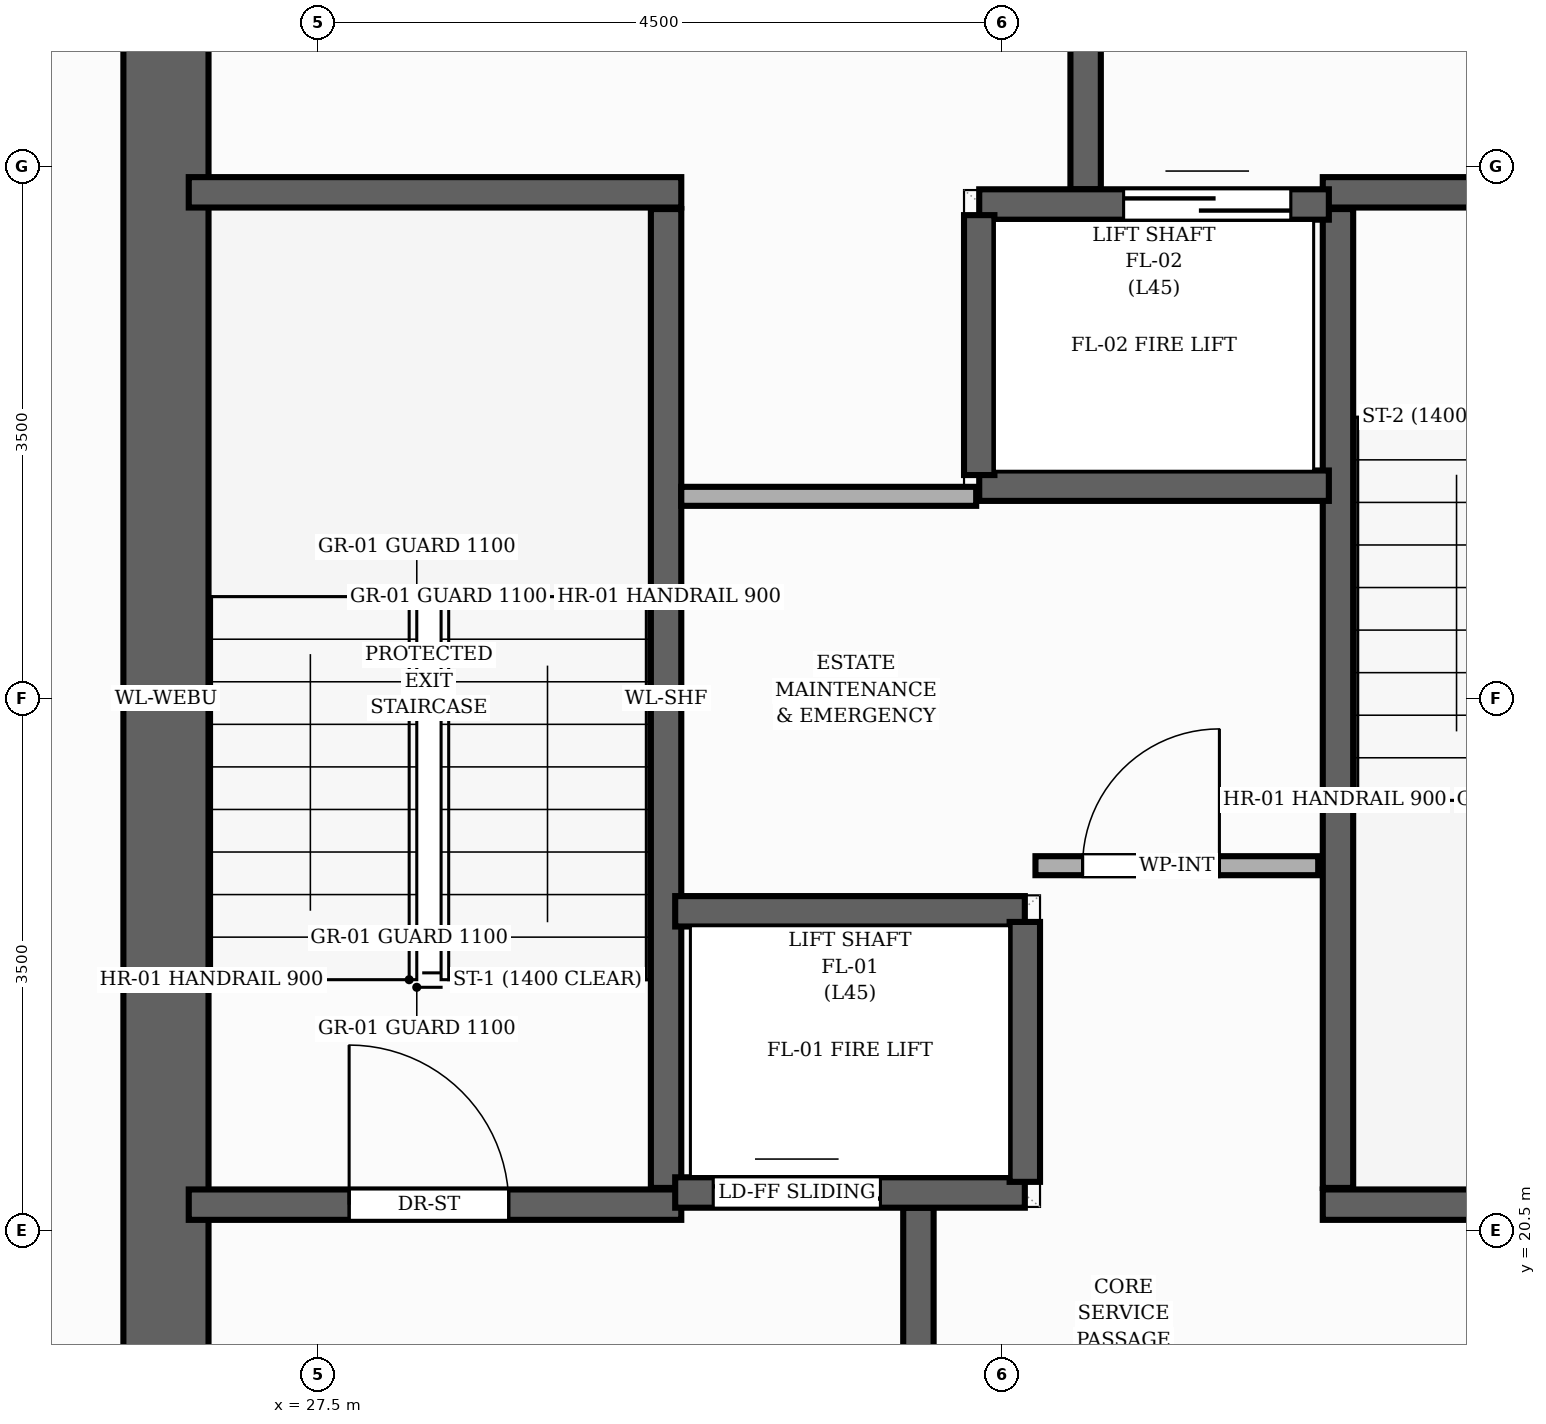
"""IFC4 building model, lengths in metres.
Left out: names, types, materials, properties, quantities, classifications, styles, units other than length and angle.
Written with IfcOpenShell. Run it as: python <this file> out.ifc"""

import sys

from ifc_helpers import new_model, si_unit, direction, frame, frame_2d, origin, place, context, subcontext, project, spatial, rectangle, extrude, element, fill, save


model = new_model("IFC4")
c1 = context("Model", 3, precision=1e-05, world=origin(), true_north=direction((0.0, 1.0)))
c2 = subcontext(c1, "Body", "Model", "MODEL_VIEW")
j1 = project(units=[si_unit("LENGTHUNIT", "METRE"), si_unit("PLANEANGLEUNIT", "RADIAN")], contexts=[c1])
p1 = place(None, origin())
s1 = spatial("IfcSite", under=j1, at=p1, CompositionType="ELEMENT")
p2 = place(p1, origin())
s2 = spatial("IfcBuilding", under=s1, at=p2, CompositionType="ELEMENT")
p3 = place(p2, frame((0.0, 0.0, 152.16)))
s3 = spatial("IfcBuildingStorey", under=s2, at=p3, CompositionType="ELEMENT", Elevation=152.16)
p4 = place(p3, frame((26.5, 17.3, 0.0), z_axis=(0.0, 0.0, 1.0), x_axis=(0.0, 1.0, 0.0)))
e1 = element("IfcWall", 1, at=p4, inside=s3, PredefinedType="SHEAR", context=c2, shape_type="SweptSolid", body=[
    extrude(rectangle(XDim=13.4, YDim=0.56, at=frame_2d((6.7, 0.0))), origin(), (0.0, 0.0, 1.0), 3.2),
])
p5 = place(p3, frame((29.79, 20.78, 0.0), z_axis=(0.0, 0.0, 1.0), x_axis=(0.0, 1.0, 0.0)))
e2 = element("IfcWall", 2, at=p5, inside=s3, PredefinedType="SHEAR", context=c2, shape_type="SweptSolid", body=[
    extrude(rectangle(XDim=6.44, YDim=0.2, at=frame_2d((3.22, 0.0))), origin(), (0.0, 0.0, 1.0), 3.2),
])
p6 = place(p3, frame((26.65, 27.33, 0.0), z_axis=(0.0, 0.0, 1.0), x_axis=(1.0, 0.0, 0.0)))
e3 = element("IfcWall", 3, at=p6, inside=s3, PredefinedType="SHEAR", context=c2, shape_type="SweptSolid", body=[
    extrude(rectangle(XDim=3.24, YDim=0.2, at=frame_2d((1.62, 0.0))), origin(), (0.0, 0.0, 1.0), 3.2),
])
p7 = place(p3, frame((26.65, 20.67, 0.0), z_axis=(0.0, 0.0, 1.0), x_axis=(1.0, 0.0, 0.0)))
e4 = element("IfcWall", 4, at=p7, inside=s3, PredefinedType="SHEAR", context=c2, shape_type="SweptSolid", body=[
    extrude(rectangle(XDim=3.24, YDim=0.2, at=frame_2d((1.62, 0.0))), origin(), (0.0, 0.0, 1.0), 3.2),
])
p8 = place(p7, frame((1.055, 0.0, 0.0)))
e5 = element("IfcOpeningElement", 5, at=p8, cuts=e4, PredefinedType="OPENING", context=c2, shape_type="SweptSolid", body=[
    extrude(rectangle(XDim=1.05, YDim=2.15, at=frame_2d((0.525, 1.075))), frame((0.0, 0.11, 0.0), z_axis=(0.0, -1.0, 0.0), x_axis=(1.0, 0.0, 0.0)), (0.0, 0.0, 1.0), 0.22),
])
p9 = place(p3, frame((34.21, 20.78, 0.0), z_axis=(0.0, 0.0, 1.0), x_axis=(0.0, 1.0, 0.0)))
e6 = element("IfcWall", 6, at=p9, inside=s3, PredefinedType="SHEAR", context=c2, shape_type="SweptSolid", body=[
    extrude(rectangle(XDim=6.44, YDim=0.2, at=frame_2d((3.22, 0.0))), origin(), (0.0, 0.0, 1.0), 3.2),
])
p10 = place(p3, frame((34.11, 20.67, 0.0), z_axis=(0.0, 0.0, 1.0), x_axis=(1.0, 0.0, 0.0)))
e7 = element("IfcWall", 7, at=p10, inside=s3, PredefinedType="SHEAR", context=c2, shape_type="SweptSolid", body=[
    extrude(rectangle(XDim=3.24, YDim=0.2, at=frame_2d((1.62, 0.0))), origin(), (0.0, 0.0, 1.0), 3.2),
])
p11 = place(p3, frame((34.11, 27.33, 0.0), z_axis=(0.0, 0.0, 1.0), x_axis=(1.0, 0.0, 0.0)))
e8 = element("IfcWall", 8, at=p11, inside=s3, PredefinedType="SHEAR", context=c2, shape_type="SweptSolid", body=[
    extrude(rectangle(XDim=3.24, YDim=0.2, at=frame_2d((1.62, 0.0))), origin(), (0.0, 0.0, 1.0), 3.2),
])
p12 = place(p11, frame((1.135, 0.0, 0.0)))
e9 = element("IfcOpeningElement", 9, at=p12, cuts=e8, PredefinedType="OPENING", context=c2, shape_type="SweptSolid", body=[
    extrude(rectangle(XDim=1.05, YDim=2.15, at=frame_2d((0.525, 1.075))), frame((0.0, 0.11, 0.0), z_axis=(0.0, -1.0, 0.0), x_axis=(1.0, 0.0, 0.0)), (0.0, 0.0, 1.0), 0.22),
])
for number, where, z_axis, x_axis in (
    (10, (31.45, 17.15, 0.0), (0.0, 0.0, 1.0), (0.0, 1.0, 0.0)),
    (11, (32.55, 27.35, 0.0), (0.0, 0.0, 1.0), (0.0, 1.0, 0.0)),
):
    element("IfcWall", number, at=place(p3, frame(where, z_axis=z_axis, x_axis=x_axis)), inside=s3, PredefinedType="SHEAR", context=c2, shape_type="SweptSolid", body=[
        extrude(rectangle(XDim=3.5, YDim=0.2, at=frame_2d((1.75, 0.0))), origin(), (0.0, 0.0, 1.0), 3.2),
    ])
p13 = place(p3, frame((29.85, 20.75, 0.0), z_axis=(0.0, 0.0, 1.0), x_axis=(1.0, 0.0, 0.0)))
e12 = element("IfcWall", 12, at=p13, inside=s3, PredefinedType="SHEAR", context=c2, shape_type="SweptSolid", body=[
    extrude(rectangle(XDim=2.3, YDim=0.2, at=frame_2d((1.15, 0.0))), origin(), (0.0, 0.0, 1.0), 3.2),
])
p14 = place(p13, frame((0.25, 0.0, 0.0)))
e13 = element("IfcOpeningElement", 13, at=p14, cuts=e12, PredefinedType="OPENING", context=c2, shape_type="SweptSolid", body=[
    extrude(rectangle(XDim=1.1, YDim=2.15, at=frame_2d((0.55, 1.075))), frame((0.0, 0.11, 0.0), z_axis=(0.0, -1.0, 0.0), x_axis=(1.0, 0.0, 0.0)), (0.0, 0.0, 1.0), 0.22),
])
p15 = place(p3, frame((29.85, 22.6, 0.0), z_axis=(0.0, 0.0, 1.0), x_axis=(1.0, 0.0, 0.0)))
e14 = element("IfcWall", 14, at=p15, inside=s3, PredefinedType="SHEAR", context=c2, shape_type="SweptSolid", body=[
    extrude(rectangle(XDim=2.3, YDim=0.2, at=frame_2d((1.15, 0.0))), origin(), (0.0, 0.0, 1.0), 3.2),
])
p16 = place(p3, frame((32.15, 20.82, 0.0), z_axis=(0.0, 0.0, 1.0), x_axis=(0.0, 1.0, 0.0)))
e15 = element("IfcWall", 15, at=p16, inside=s3, PredefinedType="SHEAR", context=c2, shape_type="SweptSolid", body=[
    extrude(rectangle(XDim=1.71, YDim=0.2, at=frame_2d((0.855, 0.0))), origin(), (0.0, 0.0, 1.0), 3.2),
])
p17 = place(p3, frame((31.85, 27.25, 0.0), z_axis=(0.0, 0.0, 1.0), x_axis=(1.0, 0.0, 0.0)))
e16 = element("IfcWall", 16, at=p17, inside=s3, PredefinedType="SHEAR", context=c2, shape_type="SweptSolid", body=[
    extrude(rectangle(XDim=2.3, YDim=0.2, at=frame_2d((1.15, 0.0))), origin(), (0.0, 0.0, 1.0), 3.2),
])
p18 = place(p17, frame((0.95, 0.0, 0.0)))
e17 = element("IfcOpeningElement", 17, at=p18, cuts=e16, PredefinedType="OPENING", context=c2, shape_type="SweptSolid", body=[
    extrude(rectangle(XDim=1.1, YDim=2.15, at=frame_2d((0.55, 1.075))), frame((0.0, 0.11, 0.0), z_axis=(0.0, -1.0, 0.0), x_axis=(1.0, 0.0, 0.0)), (0.0, 0.0, 1.0), 0.22),
])
p19 = place(p3, frame((31.85, 25.4, 0.0), z_axis=(0.0, 0.0, 1.0), x_axis=(1.0, 0.0, 0.0)))
e18 = element("IfcWall", 18, at=p19, inside=s3, PredefinedType="SHEAR", context=c2, shape_type="SweptSolid", body=[
    extrude(rectangle(XDim=2.3, YDim=0.2, at=frame_2d((1.15, 0.0))), origin(), (0.0, 0.0, 1.0), 3.2),
])
p20 = place(p3, frame((31.85, 25.47, 0.0), z_axis=(0.0, 0.0, 1.0), x_axis=(0.0, 1.0, 0.0)))
e19 = element("IfcWall", 19, at=p20, inside=s3, PredefinedType="SHEAR", context=c2, shape_type="SweptSolid", body=[
    extrude(rectangle(XDim=1.71, YDim=0.2, at=frame_2d((0.855, 0.0))), origin(), (0.0, 0.0, 1.0), 3.2),
])
p21 = place(p3, frame((32.22, 22.9, 0.0), z_axis=(0.0, 0.0, 1.0), x_axis=(1.0, 0.0, 0.0)))
e20 = element("IfcWall", 20, at=p21, inside=s3, PredefinedType="PARTITIONING", context=c2, shape_type="SweptSolid", body=[
    extrude(rectangle(XDim=1.86, YDim=0.125, at=frame_2d((0.93, 0.0))), origin(), (0.0, 0.0, 1.0), 2.955),
])
p22 = place(p21, frame((0.31, 0.0, 0.0)))
e21 = element("IfcOpeningElement", 21, at=p22, cuts=e20, PredefinedType="OPENING", context=c2, shape_type="SweptSolid", body=[
    extrude(rectangle(XDim=0.9, YDim=2.1, at=frame_2d((0.45, 1.05))), frame((0.0, 0.073, 0.0), z_axis=(0.0, -1.0, 0.0), x_axis=(1.0, 0.0, 0.0)), (0.0, 0.0, 1.0), 0.145),
])
p23 = place(p3, frame((29.89, 25.33, 0.0), z_axis=(0.0, 0.0, 1.0), x_axis=(1.0, 0.0, 0.0)))
e22 = element("IfcWall", 22, at=p23, inside=s3, PredefinedType="PARTITIONING", context=c2, shape_type="SweptSolid", body=[
    extrude(rectangle(XDim=1.94, YDim=0.125, at=frame_2d((0.97, 0.0))), origin(), (0.0, 0.0, 1.0), 2.955),
])
p24 = place(p8, origin())
e23 = element("IfcDoor", 23, at=p24, inside=s3, OperationType="SINGLE_SWING_LEFT", PredefinedType="DOOR", context=c2, shape_type="SweptSolid", body=[
    extrude(rectangle(XDim=1.05, YDim=2.15, at=frame_2d((0.525, 1.075))), frame((0.0, 0.025, 0.0), z_axis=(0.0, -1.0, 0.0), x_axis=(1.0, 0.0, 0.0)), (0.0, 0.0, 1.0), 0.05),
])
fill(e5, e23)
p25 = place(p14, origin())
e24 = element("IfcDoor", 24, at=p25, inside=s3, OperationType="DOUBLE_DOOR_SLIDING", PredefinedType="DOOR", context=c2, shape_type="SweptSolid", body=[
    extrude(rectangle(XDim=1.1, YDim=2.15, at=frame_2d((0.55, 1.075))), frame((0.0, 0.025, 0.0), z_axis=(0.0, -1.0, 0.0), x_axis=(1.0, 0.0, 0.0)), (0.0, 0.0, 1.0), 0.05),
])
fill(e13, e24)
p26 = place(p18, origin())
e25 = element("IfcDoor", 25, at=p26, inside=s3, OperationType="DOUBLE_DOOR_SLIDING", PredefinedType="DOOR", context=c2, shape_type="SweptSolid", body=[
    extrude(rectangle(XDim=1.1, YDim=2.15, at=frame_2d((0.55, 1.075))), frame((0.0, 0.025, 0.0), z_axis=(0.0, -1.0, 0.0), x_axis=(1.0, 0.0, 0.0)), (0.0, 0.0, 1.0), 0.05),
])
fill(e17, e25)
p27 = place(p22, origin())
e26 = element("IfcDoor", 26, at=p27, inside=s3, OperationType="SINGLE_SWING_RIGHT", PredefinedType="DOOR", context=c2, shape_type="SweptSolid", body=[
    extrude(rectangle(XDim=0.9, YDim=2.1, at=frame_2d((0.45, 1.05))), frame((0.0, 0.025, 0.0), z_axis=(0.0, -1.0, 0.0), x_axis=(1.0, 0.0, 0.0)), (0.0, 0.0, 1.0), 0.05),
])
fill(e21, e26)
save(model, sys.argv[1])
